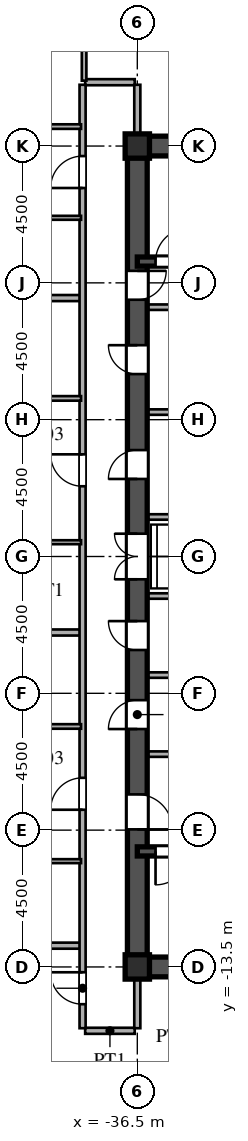
"""IFC4 building model, lengths in metres.
Left out: names, types, materials, properties, quantities, classifications, styles, units other than length and angle.
Written with IfcOpenShell. Run it as: python <this file> out.ifc"""

import sys

from ifc_helpers import new_model, si_unit, direction, frame, frame_2d, origin, origin_2d, place, context, subcontext, project, spatial, rectangle, i_section, extrude, source, transform, mapped, element, fill, save


model = new_model("IFC4")
c1 = context("Model", 3, precision=1e-05, world=origin(), true_north=direction((0.0, 1.0)))
c2 = subcontext(c1, "Body", "Model", "MODEL_VIEW")
j1 = project(units=[si_unit("LENGTHUNIT", "METRE"), si_unit("PLANEANGLEUNIT", "RADIAN")], contexts=[c1])
p1 = place(None, origin())
s1 = spatial("IfcSite", under=j1, at=p1, CompositionType="ELEMENT")
p2 = place(p1, origin())
s2 = spatial("IfcBuilding", under=s1, at=p2, CompositionType="ELEMENT")
p3 = place(p2, frame((0.0, 0.0, 92.4)))
s3 = spatial("IfcBuildingStorey", under=s2, at=p3, CompositionType="ELEMENT", Elevation=92.4)
m1 = source(origin(), c2, "Body", "SweptSolid", [
    extrude(i_section(OverallWidth=0.8, OverallDepth=0.8, WebThickness=0.032, FlangeThickness=0.05, at=origin_2d()), origin(), (0.0, 0.0, 1.0), 3.6),
])
for number, where, z_axis, x_axis in (
    (1, (-36.5, -13.5, 0.0), (0.0, 0.0, 1.0), (1.0, 0.0, 0.0)),
    (2, (-36.5, 13.5, 0.0), (0.0, 0.0, 1.0), (1.0, 0.0, 0.0)),
):
    element("IfcColumn", number, at=place(p3, frame(where, z_axis=z_axis, x_axis=x_axis)), inside=s3, PredefinedType="COLUMN", context=c2, shape_type="MappedRepresentation", body=[
        mapped(m1, transform((0.0, 0.0, 0.0), scale=1.0)),
    ])
for number, where, z_axis, x_axis in (
    (3, (-36.5, -13.5, 0.0), (0.0, 0.0, 1.0), (1.0, 0.0, 0.0)),
    (4, (-36.5, 13.5, 0.0), (0.0, 0.0, 1.0), (1.0, 0.0, 0.0)),
):
    element("IfcWall", number, at=place(p3, frame(where, z_axis=z_axis, x_axis=x_axis)), inside=s3, PredefinedType="SHEAR", context=c2, shape_type="SweptSolid", body=[
        extrude(rectangle(XDim=9.0, YDim=0.65, at=frame_2d((4.5, 0.0))), origin(), (0.0, 0.0, 1.0), 3.38),
    ])
p4 = place(p3, frame((-36.5, -13.65, 0.0), z_axis=(0.0, 0.0, 1.0), x_axis=(0.0, 1.0, 0.0)))
e5 = element("IfcWall", 5, at=p4, inside=s3, PredefinedType="SHEAR", context=c2, shape_type="SweptSolid", body=[
    extrude(rectangle(XDim=7.15, YDim=0.65, at=frame_2d((3.575, 0.0))), origin(), (0.0, 0.0, 1.0), 3.38),
])
p5 = place(p4, frame((4.675, 0.0, 0.0)))
e6 = element("IfcOpeningElement", 6, at=p5, cuts=e5, PredefinedType="OPENING", context=c2, shape_type="SweptSolid", body=[
    extrude(rectangle(XDim=1.15, YDim=2.2, at=frame_2d((0.575, 1.1))), frame((0.0, 0.335, 0.0), z_axis=(0.0, -1.0, 0.0), x_axis=(1.0, 0.0, 0.0)), (0.0, 0.0, 1.0), 0.67),
])
p6 = place(p3, frame((-36.5, -1.3, 0.0), z_axis=(0.0, 0.0, 1.0), x_axis=(0.0, 1.0, 0.0)))
e7 = element("IfcWall", 7, at=p6, inside=s3, PredefinedType="SHEAR", context=c2, shape_type="SweptSolid", body=[
    extrude(rectangle(XDim=2.6, YDim=0.65, at=frame_2d((1.3, 0.0))), origin(), (0.0, 0.0, 1.0), 3.38),
])
p7 = place(p6, frame((0.55, 0.0, 0.0)))
e8 = element("IfcOpeningElement", 8, at=p7, cuts=e7, PredefinedType="OPENING", context=c2, shape_type="SweptSolid", body=[
    extrude(rectangle(XDim=1.5, YDim=2.3, at=frame_2d((0.75, 1.15))), frame((0.0, 0.335, 0.0), z_axis=(0.0, -1.0, 0.0), x_axis=(1.0, 0.0, 0.0)), (0.0, 0.0, 1.0), 0.67),
])
p8 = place(p3, frame((-36.5, 8.2, 0.0), z_axis=(0.0, 0.0, 1.0), x_axis=(0.0, 1.0, 0.0)))
e9 = element("IfcWall", 9, at=p8, inside=s3, PredefinedType="SHEAR", context=c2, shape_type="SweptSolid", body=[
    extrude(rectangle(XDim=5.45, YDim=0.65, at=frame_2d((2.725, 0.0))), origin(), (0.0, 0.0, 1.0), 3.38),
])
p9 = place(p8, frame((0.245, 0.0, 0.0)))
e10 = element("IfcOpeningElement", 10, at=p9, cuts=e9, PredefinedType="OPENING", context=c2, shape_type="SweptSolid", body=[
    extrude(rectangle(XDim=0.95, YDim=2.15, at=frame_2d((0.475, 1.075))), frame((0.0, 0.335, 0.0), z_axis=(0.0, -1.0, 0.0), x_axis=(1.0, 0.0, 0.0)), (0.0, 0.0, 1.0), 0.67),
])
p10 = place(p3, frame((-36.5, -6.5, 0.0), z_axis=(0.0, 0.0, 1.0), x_axis=(0.0, 1.0, 0.0)))
e11 = element("IfcWall", 11, at=p10, inside=s3, PredefinedType="SHEAR", context=c2, shape_type="SweptSolid", body=[
    extrude(rectangle(XDim=2.6, YDim=0.65, at=frame_2d((1.3, 0.0))), origin(), (0.0, 0.0, 1.0), 3.38),
])
p11 = place(p10, frame((0.825, 0.0, 0.0)))
e12 = element("IfcOpeningElement", 12, at=p11, cuts=e11, PredefinedType="OPENING", context=c2, shape_type="SweptSolid", body=[
    extrude(rectangle(XDim=0.95, YDim=2.15, at=frame_2d((0.475, 1.075))), frame((0.0, 0.335, 0.0), z_axis=(0.0, -1.0, 0.0), x_axis=(1.0, 0.0, 0.0)), (0.0, 0.0, 1.0), 0.67),
])
p12 = place(p3, frame((-36.5, -3.9, 0.0), z_axis=(0.0, 0.0, 1.0), x_axis=(0.0, 1.0, 0.0)))
e13 = element("IfcWall", 13, at=p12, inside=s3, PredefinedType="SHEAR", context=c2, shape_type="SweptSolid", body=[
    extrude(rectangle(XDim=2.6, YDim=0.65, at=frame_2d((1.3, 0.0))), origin(), (0.0, 0.0, 1.0), 3.38),
])
p13 = place(p12, frame((0.825, 0.0, 0.0)))
e14 = element("IfcOpeningElement", 14, at=p13, cuts=e13, PredefinedType="OPENING", context=c2, shape_type="SweptSolid", body=[
    extrude(rectangle(XDim=0.95, YDim=2.15, at=frame_2d((0.475, 1.075))), frame((0.0, 0.335, 0.0), z_axis=(0.0, -1.0, 0.0), x_axis=(1.0, 0.0, 0.0)), (0.0, 0.0, 1.0), 0.67),
])
p14 = place(p3, frame((-36.5, 1.3, 0.0), z_axis=(0.0, 0.0, 1.0), x_axis=(0.0, 1.0, 0.0)))
e15 = element("IfcWall", 15, at=p14, inside=s3, PredefinedType="SHEAR", context=c2, shape_type="SweptSolid", body=[
    extrude(rectangle(XDim=3.45, YDim=0.65, at=frame_2d((1.725, 0.0))), origin(), (0.0, 0.0, 1.0), 3.38),
])
p15 = place(p14, frame((1.25, 0.0, 0.0)))
e16 = element("IfcOpeningElement", 16, at=p15, cuts=e15, PredefinedType="OPENING", context=c2, shape_type="SweptSolid", body=[
    extrude(rectangle(XDim=0.95, YDim=2.15, at=frame_2d((0.475, 1.075))), frame((0.0, 0.335, 0.0), z_axis=(0.0, -1.0, 0.0), x_axis=(1.0, 0.0, 0.0)), (0.0, 0.0, 1.0), 0.67),
])
p16 = place(p3, frame((-36.5, 4.75, 0.0), z_axis=(0.0, 0.0, 1.0), x_axis=(0.0, 1.0, 0.0)))
e17 = element("IfcWall", 17, at=p16, inside=s3, PredefinedType="SHEAR", context=c2, shape_type="SweptSolid", body=[
    extrude(rectangle(XDim=3.45, YDim=0.65, at=frame_2d((1.725, 0.0))), origin(), (0.0, 0.0, 1.0), 3.38),
])
p17 = place(p16, frame((1.25, 0.0, 0.0)))
e18 = element("IfcOpeningElement", 18, at=p17, cuts=e17, PredefinedType="OPENING", context=c2, shape_type="SweptSolid", body=[
    extrude(rectangle(XDim=0.95, YDim=2.15, at=frame_2d((0.475, 1.075))), frame((0.0, 0.335, 0.0), z_axis=(0.0, -1.0, 0.0), x_axis=(1.0, 0.0, 0.0)), (0.0, 0.0, 1.0), 0.67),
])
p18 = place(p3, frame((-36.5, -9.7, 0.0), z_axis=(0.0, 0.0, 1.0), x_axis=(1.0, 0.0, 0.0)))
e19 = element("IfcWall", 19, at=p18, inside=s3, PredefinedType="SHEAR", context=c2, shape_type="SweptSolid", body=[
    extrude(rectangle(XDim=9.0, YDim=0.3, at=frame_2d((4.5, 0.0))), origin(), (0.0, 0.0, 1.0), 3.38),
])
p19 = place(p18, frame((0.6, 0.0, 0.0)))
e20 = element("IfcOpeningElement", 20, at=p19, cuts=e19, PredefinedType="OPENING", context=c2, shape_type="SweptSolid", body=[
    extrude(rectangle(XDim=1.1, YDim=2.2, at=frame_2d((0.55, 1.1))), frame((0.0, 0.16, 0.0), z_axis=(0.0, -1.0, 0.0), x_axis=(1.0, 0.0, 0.0)), (0.0, 0.0, 1.0), 0.32),
])
p20 = place(p3, frame((-36.5, 9.7, 0.0), z_axis=(0.0, 0.0, 1.0), x_axis=(1.0, 0.0, 0.0)))
e21 = element("IfcWall", 21, at=p20, inside=s3, PredefinedType="SHEAR", context=c2, shape_type="SweptSolid", body=[
    extrude(rectangle(XDim=9.0, YDim=0.3, at=frame_2d((4.5, 0.0))), origin(), (0.0, 0.0, 1.0), 3.38),
])
p21 = place(p20, frame((0.6, 0.0, 0.0)))
e22 = element("IfcOpeningElement", 22, at=p21, cuts=e21, PredefinedType="OPENING", context=c2, shape_type="SweptSolid", body=[
    extrude(rectangle(XDim=1.1, YDim=2.2, at=frame_2d((0.55, 1.1))), frame((0.0, 0.16, 0.0), z_axis=(0.0, -1.0, 0.0), x_axis=(1.0, 0.0, 0.0)), (0.0, 0.0, 1.0), 0.32),
])
for number, where, z_axis, x_axis in (
    (23, (-36.15, -6.5, 0.0), (0.0, 0.0, 1.0), (1.0, 0.0, 0.0)),
    (24, (-36.15, 8.2, 0.0), (0.0, 0.0, 1.0), (1.0, 0.0, 0.0)),
):
    element("IfcWall", number, at=place(p3, frame(where, z_axis=z_axis, x_axis=x_axis)), inside=s3, PredefinedType="PARTITIONING", context=c2, shape_type="SweptSolid", body=[
        extrude(rectangle(XDim=5.7, YDim=0.18, at=frame_2d((2.85, 0.0))), origin(), (0.0, 0.0, 1.0), 3.38),
    ])
for number, where, z_axis, x_axis in (
    (25, (-36.15, -1.3, 0.0), (0.0, 0.0, 1.0), (1.0, 0.0, 0.0)),
    (26, (-36.15, 1.3, 0.0), (0.0, 0.0, 1.0), (1.0, 0.0, 0.0)),
    (27, (-36.15, -3.9, 0.0), (0.0, 0.0, 1.0), (1.0, 0.0, 0.0)),
    (28, (-36.15, 4.75, 0.0), (0.0, 0.0, 1.0), (1.0, 0.0, 0.0)),
):
    element("IfcWall", number, at=place(p3, frame(where, z_axis=z_axis, x_axis=x_axis)), inside=s3, PredefinedType="PARTITIONING", context=c2, shape_type="SweptSolid", body=[
        extrude(rectangle(XDim=2.95, YDim=0.18, at=frame_2d((1.475, 0.0))), origin(), (0.0, 0.0, 1.0), 3.38),
    ])
p22 = place(p3, frame((-38.215, -15.6, 0.0), z_axis=(0.0, 0.0, 1.0), x_axis=(1.0, 0.0, 0.0)))
e29 = element("IfcWall", 29, at=p22, inside=s3, PredefinedType="PARTITIONING", context=c2, shape_type="SweptSolid", body=[
    extrude(rectangle(XDim=1.63, YDim=0.2, at=frame_2d((0.815, 0.0))), origin(), (0.0, 0.0, 1.0), 3.38),
])
p23 = place(p3, frame((-59.234, -12.8, 0.0), z_axis=(0.0, 0.0, 1.0), x_axis=(1.0, 0.0, 0.0)))
e30 = element("IfcWall", 30, at=p23, inside=s3, PredefinedType="PARTITIONING", context=c2, shape_type="SweptSolid", body=[
    extrude(rectangle(XDim=20.854, YDim=0.2, at=frame_2d((10.427, 0.0))), origin(), (0.0, 0.0, 1.0), 3.38),
])
p24 = place(p3, frame((-44.1, -10.02, 0.0), z_axis=(0.0, 0.0, 1.0), x_axis=(1.0, 0.0, 0.0)))
e31 = element("IfcWall", 31, at=p24, inside=s3, PredefinedType="PARTITIONING", context=c2, shape_type="SweptSolid", body=[
    extrude(rectangle(XDim=5.75, YDim=0.13, at=frame_2d((2.875, 0.0))), origin(), (0.0, 0.0, 1.0), 3.38),
])
p25 = place(p24, frame((2.435, 0.0, 0.0)))
e32 = element("IfcOpeningElement", 32, at=p25, cuts=e31, PredefinedType="OPENING", context=c2, shape_type="SweptSolid", body=[
    extrude(rectangle(XDim=0.88, YDim=2.1, at=frame_2d((0.44, 1.05))), frame((0.0, 0.075, 0.0), z_axis=(0.0, -1.0, 0.0), x_axis=(1.0, 0.0, 0.0)), (0.0, 0.0, 1.0), 0.15),
])
p26 = place(p3, frame((-44.1, -5.59, 0.0), z_axis=(0.0, 0.0, 1.0), x_axis=(1.0, 0.0, 0.0)))
e33 = element("IfcWall", 33, at=p26, inside=s3, PredefinedType="PARTITIONING", context=c2, shape_type="SweptSolid", body=[
    extrude(rectangle(XDim=5.75, YDim=0.15, at=frame_2d((2.875, 0.0))), origin(), (0.0, 0.0, 1.0), 3.38),
])
p27 = place(p26, frame((2.4, 0.0, 0.0)))
e34 = element("IfcOpeningElement", 34, at=p27, cuts=e33, PredefinedType="OPENING", context=c2, shape_type="SweptSolid", body=[
    extrude(rectangle(XDim=0.95, YDim=2.15, at=frame_2d((0.475, 1.075))), frame((0.0, 0.085, 0.0), z_axis=(0.0, -1.0, 0.0), x_axis=(1.0, 0.0, 0.0)), (0.0, 0.0, 1.0), 0.17),
])
p28 = place(p3, frame((-71.005, -2.5, 0.0), z_axis=(0.0, 0.0, 1.0), x_axis=(1.0, 0.0, 0.0)))
e35 = element("IfcWall", 35, at=p28, inside=s3, PredefinedType="PARTITIONING", context=c2, shape_type="SweptSolid", body=[
    extrude(rectangle(XDim=32.625, YDim=0.2, at=frame_2d((16.312, 0.0))), origin(), (0.0, 0.0, 1.0), 3.38),
])
p29 = place(p3, frame((-44.1, 0.47, 0.0), z_axis=(0.0, 0.0, 1.0), x_axis=(1.0, 0.0, 0.0)))
e36 = element("IfcWall", 36, at=p29, inside=s3, PredefinedType="PARTITIONING", context=c2, shape_type="SweptSolid", body=[
    extrude(rectangle(XDim=5.75, YDim=0.13, at=frame_2d((2.875, 0.0))), origin(), (0.0, 0.0, 1.0), 3.38),
])
p30 = place(p29, frame((2.435, 0.0, 0.0)))
e37 = element("IfcOpeningElement", 37, at=p30, cuts=e36, PredefinedType="OPENING", context=c2, shape_type="SweptSolid", body=[
    extrude(rectangle(XDim=0.88, YDim=2.1, at=frame_2d((0.44, 1.05))), frame((0.0, 0.075, 0.0), z_axis=(0.0, -1.0, 0.0), x_axis=(1.0, 0.0, 0.0)), (0.0, 0.0, 1.0), 0.15),
])
p31 = place(p3, frame((-44.1, 5.2, 0.0), z_axis=(0.0, 0.0, 1.0), x_axis=(1.0, 0.0, 0.0)))
e38 = element("IfcWall", 38, at=p31, inside=s3, PredefinedType="PARTITIONING", context=c2, shape_type="SweptSolid", body=[
    extrude(rectangle(XDim=5.75, YDim=0.15, at=frame_2d((2.875, 0.0))), origin(), (0.0, 0.0, 1.0), 3.38),
])
p32 = place(p31, frame((2.4, 0.0, 0.0)))
e39 = element("IfcOpeningElement", 39, at=p32, cuts=e38, PredefinedType="OPENING", context=c2, shape_type="SweptSolid", body=[
    extrude(rectangle(XDim=0.95, YDim=2.15, at=frame_2d((0.475, 1.075))), frame((0.0, 0.085, 0.0), z_axis=(0.0, -1.0, 0.0), x_axis=(1.0, 0.0, 0.0)), (0.0, 0.0, 1.0), 0.17),
])
p33 = place(p3, frame((-68.79, 8.5, 0.0), z_axis=(0.0, 0.0, 1.0), x_axis=(1.0, 0.0, 0.0)))
e40 = element("IfcWall", 40, at=p33, inside=s3, PredefinedType="PARTITIONING", context=c2, shape_type="SweptSolid", body=[
    extrude(rectangle(XDim=30.41, YDim=0.2, at=frame_2d((15.205, 0.0))), origin(), (0.0, 0.0, 1.0), 3.38),
])
p34 = place(p3, frame((-44.1, 11.14, 0.0), z_axis=(0.0, 0.0, 1.0), x_axis=(1.0, 0.0, 0.0)))
e41 = element("IfcWall", 41, at=p34, inside=s3, PredefinedType="PARTITIONING", context=c2, shape_type="SweptSolid", body=[
    extrude(rectangle(XDim=5.75, YDim=0.13, at=frame_2d((2.875, 0.0))), origin(), (0.0, 0.0, 1.0), 3.38),
])
p35 = place(p34, frame((2.435, 0.0, 0.0)))
e42 = element("IfcOpeningElement", 42, at=p35, cuts=e41, PredefinedType="OPENING", context=c2, shape_type="SweptSolid", body=[
    extrude(rectangle(XDim=0.88, YDim=2.1, at=frame_2d((0.44, 1.05))), frame((0.0, 0.075, 0.0), z_axis=(0.0, -1.0, 0.0), x_axis=(1.0, 0.0, 0.0)), (0.0, 0.0, 1.0), 0.15),
])
p36 = place(p3, frame((-44.1, 14.14, 0.0), z_axis=(0.0, 0.0, 1.0), x_axis=(1.0, 0.0, 0.0)))
e43 = element("IfcWall", 43, at=p36, inside=s3, PredefinedType="PARTITIONING", context=c2, shape_type="SweptSolid", body=[
    extrude(rectangle(XDim=5.75, YDim=0.15, at=frame_2d((2.875, 0.0))), origin(), (0.0, 0.0, 1.0), 3.38),
])
p37 = place(p36, frame((2.4, 0.0, 0.0)))
e44 = element("IfcOpeningElement", 44, at=p37, cuts=e43, PredefinedType="OPENING", context=c2, shape_type="SweptSolid", body=[
    extrude(rectangle(XDim=0.95, YDim=2.15, at=frame_2d((0.475, 1.075))), frame((0.0, 0.085, 0.0), z_axis=(0.0, -1.0, 0.0), x_axis=(1.0, 0.0, 0.0)), (0.0, 0.0, 1.0), 0.17),
])
p38 = place(p3, frame((-38.215, 15.6, 0.0), z_axis=(0.0, 0.0, 1.0), x_axis=(1.0, 0.0, 0.0)))
e45 = element("IfcWall", 45, at=p38, inside=s3, PredefinedType="PARTITIONING", context=c2, shape_type="SweptSolid", body=[
    extrude(rectangle(XDim=1.63, YDim=0.2, at=frame_2d((0.815, 0.0))), origin(), (0.0, 0.0, 1.0), 3.38),
])
p39 = place(p3, frame((-38.3, -15.515, 0.0), z_axis=(0.0, 0.0, 1.0), x_axis=(0.0, 1.0, 0.0)))
e46 = element("IfcWall", 46, at=p39, inside=s3, PredefinedType="PARTITIONING", context=c2, shape_type="SweptSolid", body=[
    extrude(rectangle(XDim=31.03, YDim=0.2, at=frame_2d((15.515, 0.0))), origin(), (0.0, 0.0, 1.0), 3.38),
])
p40 = place(p39, frame((0.79, 0.0, 0.0)))
e47 = element("IfcOpeningElement", 47, at=p40, cuts=e46, PredefinedType="OPENING", context=c2, shape_type="SweptSolid", body=[
    extrude(rectangle(XDim=1.05, YDim=2.25, at=frame_2d((0.525, 1.125))), frame((0.0, 0.11, 0.0), z_axis=(0.0, -1.0, 0.0), x_axis=(1.0, 0.0, 0.0)), (0.0, 0.0, 1.0), 0.22),
])
p41 = place(p39, frame((7.186, 0.0, 0.0)))
e48 = element("IfcOpeningElement", 48, at=p41, cuts=e46, PredefinedType="OPENING", context=c2, shape_type="SweptSolid", body=[
    extrude(rectangle(XDim=1.05, YDim=2.25, at=frame_2d((0.525, 1.125))), frame((0.0, 0.11, 0.0), z_axis=(0.0, -1.0, 0.0), x_axis=(1.0, 0.0, 0.0)), (0.0, 0.0, 1.0), 0.22),
])
p42 = place(p39, frame((17.825, 0.0, 0.0)))
e49 = element("IfcOpeningElement", 49, at=p42, cuts=e46, PredefinedType="OPENING", context=c2, shape_type="SweptSolid", body=[
    extrude(rectangle(XDim=1.05, YDim=2.25, at=frame_2d((0.525, 1.125))), frame((0.0, 0.11, 0.0), z_axis=(0.0, -1.0, 0.0), x_axis=(1.0, 0.0, 0.0)), (0.0, 0.0, 1.0), 0.22),
])
p43 = place(p39, frame((27.635, 0.0, 0.0)))
e50 = element("IfcOpeningElement", 50, at=p43, cuts=e46, PredefinedType="OPENING", context=c2, shape_type="SweptSolid", body=[
    extrude(rectangle(XDim=1.05, YDim=2.25, at=frame_2d((0.525, 1.125))), frame((0.0, 0.11, 0.0), z_axis=(0.0, -1.0, 0.0), x_axis=(1.0, 0.0, 0.0)), (0.0, 0.0, 1.0), 0.22),
])
p44 = place(p3, frame((-38.25, 15.65, 0.0), z_axis=(0.0, 0.0, 1.0), x_axis=(0.0, 1.0, 0.0)))
e51 = element("IfcWall", 51, at=p44, inside=s3, PredefinedType="PARTITIONING", context=c2, shape_type="SweptSolid", body=[
    extrude(rectangle(XDim=6.623, YDim=0.15, at=frame_2d((3.312, 0.0))), origin(), (0.0, 0.0, 1.0), 3.38),
])
p45 = place(p44, frame((1.425, 0.0, 0.0)))
e52 = element("IfcOpeningElement", 52, at=p45, cuts=e51, PredefinedType="OPENING", context=c2, shape_type="SweptSolid", body=[
    extrude(rectangle(XDim=0.95, YDim=2.15, at=frame_2d((0.475, 1.075))), frame((0.0, 0.085, 0.0), z_axis=(0.0, -1.0, 0.0), x_axis=(1.0, 0.0, 0.0)), (0.0, 0.0, 1.0), 0.17),
])
for number, where, z_axis, x_axis in (
    (53, (-36.5, -15.515, 0.0), (0.0, 0.0, 1.0), (0.0, 1.0, 0.0)),
    (54, (-36.5, 13.83, 0.0), (0.0, 0.0, 1.0), (0.0, 1.0, 0.0)),
):
    element("IfcWall", number, at=place(p3, frame(where, z_axis=z_axis, x_axis=x_axis)), inside=s3, PredefinedType="PARTITIONING", context=c2, shape_type="SweptSolid", body=[
        extrude(rectangle(XDim=1.685, YDim=0.2, at=frame_2d((0.842, 0.0))), origin(), (0.0, 0.0, 1.0), 2.68),
    ])
m2 = source(origin(), c2, "Body", "SweptSolid", [
    extrude(rectangle(XDim=1.15, YDim=2.2, at=frame_2d((0.575, 1.1))), frame((0.0, 0.025, 0.0), z_axis=(0.0, -1.0, 0.0), x_axis=(1.0, 0.0, 0.0)), (0.0, 0.0, 1.0), 0.05),
])
p46 = place(p5, frame((1.15, 0.0, 0.0), z_axis=(0.0, 0.0, 1.0), x_axis=(-1.0, 0.0, 0.0)))
e55 = element("IfcDoor", 55, at=p46, inside=s3, OperationType="SINGLE_SWING_LEFT", PredefinedType="DOOR", context=c2, shape_type="MappedRepresentation", body=[
    mapped(m2, transform((0.0, 0.0, 0.0), scale=1.0)),
])
fill(e6, e55)
m3 = source(origin(), c2, "Body", "SweptSolid", [
    extrude(rectangle(XDim=1.5, YDim=2.3, at=frame_2d((0.75, 1.15))), frame((0.0, 0.025, 0.0), z_axis=(0.0, -1.0, 0.0), x_axis=(1.0, 0.0, 0.0)), (0.0, 0.0, 1.0), 0.05),
])
p47 = place(p7, origin())
e56 = element("IfcDoor", 56, at=p47, inside=s3, OperationType="DOUBLE_SWING_LEFT", PredefinedType="DOOR", context=c2, shape_type="MappedRepresentation", body=[
    mapped(m3, transform((0.0, 0.0, 0.0), scale=1.0)),
])
fill(e8, e56)
m4 = source(origin(), c2, "Body", "SweptSolid", [
    extrude(rectangle(XDim=0.95, YDim=2.15, at=frame_2d((0.475, 1.075))), frame((0.0, 0.025, 0.0), z_axis=(0.0, -1.0, 0.0), x_axis=(1.0, 0.0, 0.0)), (0.0, 0.0, 1.0), 0.05),
])
p48 = place(p9, frame((0.95, 0.0, 0.0), z_axis=(0.0, 0.0, 1.0), x_axis=(-1.0, 0.0, 0.0)))
e57 = element("IfcDoor", 57, at=p48, inside=s3, OperationType="SINGLE_SWING_RIGHT", PredefinedType="DOOR", context=c2, shape_type="MappedRepresentation", body=[
    mapped(m4, transform((0.0, 0.0, 0.0), scale=1.0)),
])
fill(e10, e57)
p49 = place(p11, origin())
e58 = element("IfcDoor", 58, at=p49, inside=s3, OperationType="SINGLE_SWING_LEFT", PredefinedType="DOOR", context=c2, shape_type="MappedRepresentation", body=[
    mapped(m4, transform((0.0, 0.0, 0.0), scale=1.0)),
])
fill(e12, e58)
p50 = place(p13, origin())
e59 = element("IfcDoor", 59, at=p50, inside=s3, OperationType="SINGLE_SWING_RIGHT", PredefinedType="DOOR", context=c2, shape_type="MappedRepresentation", body=[
    mapped(m4, transform((0.0, 0.0, 0.0), scale=1.0)),
])
fill(e14, e59)
p51 = place(p15, origin())
e60 = element("IfcDoor", 60, at=p51, inside=s3, OperationType="SINGLE_SWING_LEFT", PredefinedType="DOOR", context=c2, shape_type="MappedRepresentation", body=[
    mapped(m4, transform((0.0, 0.0, 0.0), scale=1.0)),
])
fill(e16, e60)
p52 = place(p17, origin())
e61 = element("IfcDoor", 61, at=p52, inside=s3, OperationType="SINGLE_SWING_RIGHT", PredefinedType="DOOR", context=c2, shape_type="MappedRepresentation", body=[
    mapped(m4, transform((0.0, 0.0, 0.0), scale=1.0)),
])
fill(e18, e61)
m5 = source(origin(), c2, "Body", "SweptSolid", [
    extrude(rectangle(XDim=1.1, YDim=2.2, at=frame_2d((0.55, 1.1))), frame((0.0, 0.025, 0.0), z_axis=(0.0, -1.0, 0.0), x_axis=(1.0, 0.0, 0.0)), (0.0, 0.0, 1.0), 0.05),
])
p53 = place(p19, frame((1.1, 0.0, 0.0), z_axis=(0.0, 0.0, 1.0), x_axis=(-1.0, 0.0, 0.0)))
e62 = element("IfcDoor", 62, at=p53, inside=s3, OperationType="SINGLE_SWING_LEFT", PredefinedType="DOOR", context=c2, shape_type="MappedRepresentation", body=[
    mapped(m5, transform((0.0, 0.0, 0.0), scale=1.0)),
])
fill(e20, e62)
p54 = place(p21, origin())
e63 = element("IfcDoor", 63, at=p54, inside=s3, OperationType="SINGLE_SWING_RIGHT", PredefinedType="DOOR", context=c2, shape_type="MappedRepresentation", body=[
    mapped(m5, transform((0.0, 0.0, 0.0), scale=1.0)),
])
fill(e22, e63)
m6 = source(origin(), c2, "Body", "SweptSolid", [
    extrude(rectangle(XDim=1.05, YDim=2.25, at=frame_2d((0.525, 1.125))), frame((0.0, 0.025, 0.0), z_axis=(0.0, -1.0, 0.0), x_axis=(1.0, 0.0, 0.0)), (0.0, 0.0, 1.0), 0.05),
])
p55 = place(p40, origin())
e64 = element("IfcDoor", 64, at=p55, inside=s3, OperationType="SINGLE_SWING_RIGHT", PredefinedType="DOOR", context=c2, shape_type="MappedRepresentation", body=[
    mapped(m6, transform((0.0, 0.0, 0.0), scale=1.0)),
])
fill(e47, e64)
p56 = place(p41, origin())
e65 = element("IfcDoor", 65, at=p56, inside=s3, OperationType="SINGLE_SWING_LEFT", PredefinedType="DOOR", context=c2, shape_type="MappedRepresentation", body=[
    mapped(m6, transform((0.0, 0.0, 0.0), scale=1.0)),
])
fill(e48, e65)
p57 = place(p42, origin())
e66 = element("IfcDoor", 66, at=p57, inside=s3, OperationType="SINGLE_SWING_RIGHT", PredefinedType="DOOR", context=c2, shape_type="MappedRepresentation", body=[
    mapped(m6, transform((0.0, 0.0, 0.0), scale=1.0)),
])
fill(e49, e66)
p58 = place(p43, origin())
e67 = element("IfcDoor", 67, at=p58, inside=s3, OperationType="SINGLE_SWING_LEFT", PredefinedType="DOOR", context=c2, shape_type="MappedRepresentation", body=[
    mapped(m6, transform((0.0, 0.0, 0.0), scale=1.0)),
])
fill(e50, e67)
save(model, sys.argv[1])
